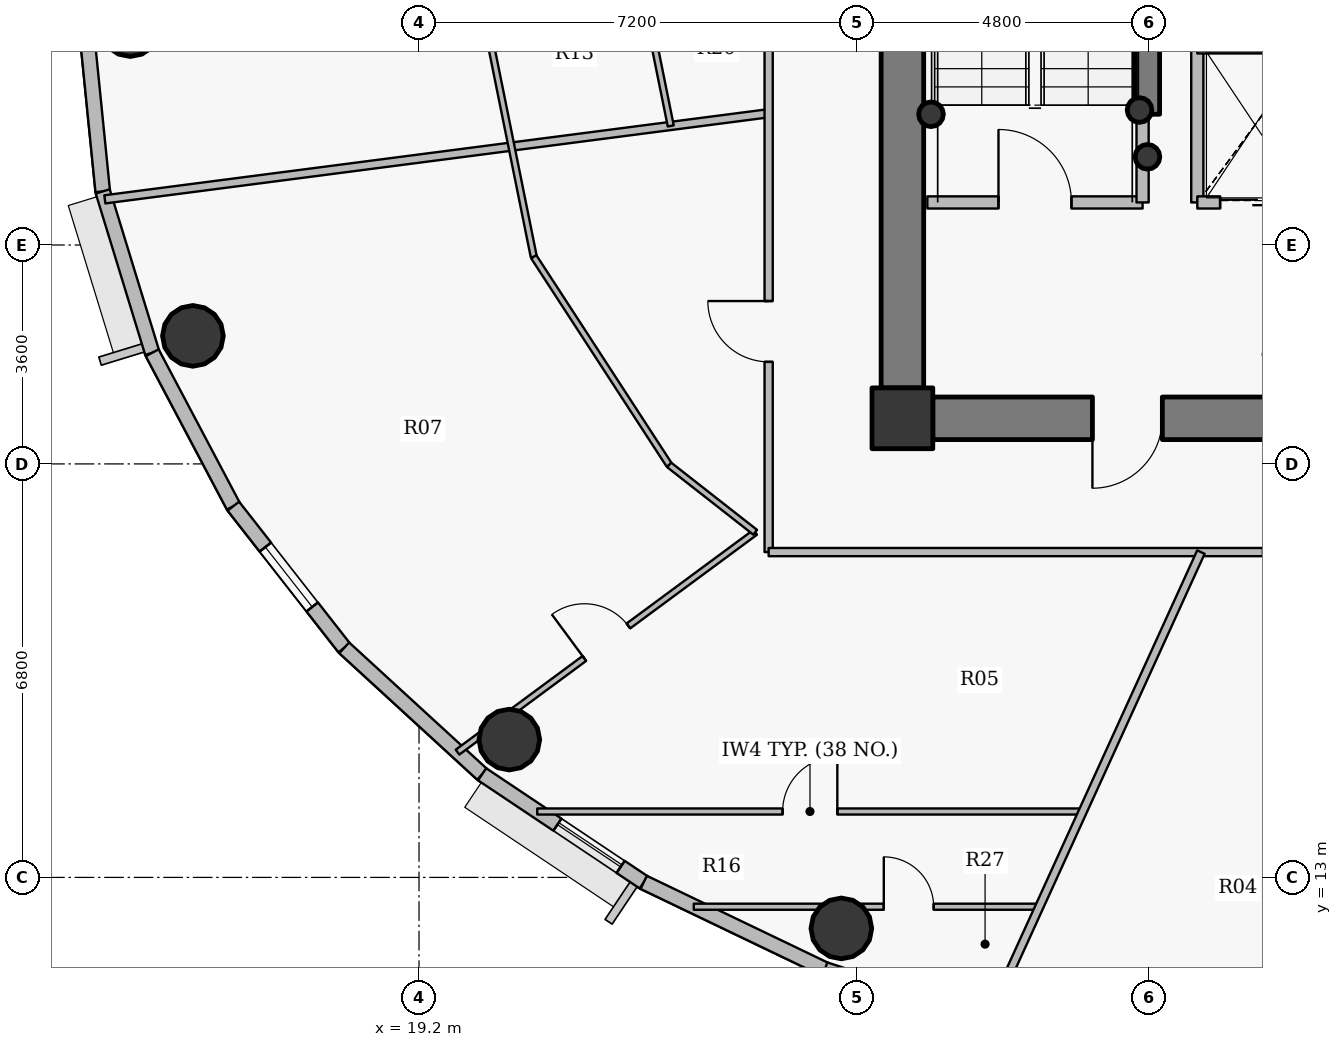
"""IFC4 building model, lengths in metres.
Left out: names, types, materials, properties, quantities, classifications, styles, units other than length and angle.
Written with IfcOpenShell. Run it as: python <this file> out.ifc"""

import sys

from ifc_helpers import new_model, si_unit, direction, frame, frame_2d, origin, origin_2d, place, context, subcontext, project, spatial, rectangle, hollow_circle, extrude, source, transform, mapped, element, fill, save


model = new_model("IFC4")
c1 = context("Model", 3, precision=1e-05, world=origin(), true_north=direction((0.0, 1.0)))
c2 = subcontext(c1, "Body", "Model", "MODEL_VIEW")
j1 = project(units=[si_unit("LENGTHUNIT", "METRE"), si_unit("PLANEANGLEUNIT", "RADIAN")], contexts=[c1])
p1 = place(None, origin())
s1 = spatial("IfcSite", under=j1, at=p1, CompositionType="ELEMENT")
p2 = place(p1, origin())
s2 = spatial("IfcBuilding", under=s1, at=p2, CompositionType="ELEMENT")
p3 = place(p2, frame((0.0, 0.0, 295.5)))
s3 = spatial("IfcBuildingStorey", under=s2, at=p3, CompositionType="ELEMENT", Elevation=295.5)
p4 = place(p3, frame((27.15, 20.55, 0.0), z_axis=(0.0, 0.0, 1.0), x_axis=(1.0, 0.0, 0.0)))
e1 = element("IfcColumn", 1, at=p4, inside=s3, PredefinedType="COLUMN", context=c2, shape_type="SweptSolid", body=[
    extrude(rectangle(XDim=1.0, YDim=1.0, at=origin_2d()), origin(), (0.0, 0.0, 1.0), 3.75),
])
for number, where, z_axis, x_axis in (
    (2, (31.05, 25.62, 0.0), (0.0, 0.0, 1.0), (1.0, 0.0, 0.0)),
    (3, (31.18, 24.85, 0.0), (0.0, 0.0, 1.0), (1.0, 0.0, 0.0)),
    (4, (27.62, 25.55, 0.0), (0.0, 0.0, 1.0), (1.0, 0.0, 0.0)),
):
    element("IfcColumn", number, at=place(p3, frame(where, z_axis=z_axis, x_axis=x_axis)), inside=s3, PredefinedType="COLUMN", context=c2, shape_type="SweptSolid", body=[
        extrude(hollow_circle(Radius=0.203, WallThickness=0.016, at=origin_2d()), origin(), (0.0, 0.0, 1.0), 3.75),
    ])
p5 = place(p3, frame((44.35, 20.55, 0.0), z_axis=(0.0, 0.0, 1.0), x_axis=(-1.0, 0.0, 0.0)))
e5 = element("IfcWall", 5, at=p5, inside=s3, PredefinedType="SHEAR", context=c2, shape_type="SweptSolid", body=[
    extrude(rectangle(XDim=16.7, YDim=0.7, at=frame_2d((8.35, 0.0))), origin(), (0.0, 0.0, 1.0), 3.05),
])
p6 = place(p5, frame((12.925, 0.0, 0.0)))
e6 = element("IfcOpeningElement", 6, at=p6, cuts=e5, PredefinedType="OPENING", context=c2, shape_type="SweptSolid", body=[
    extrude(rectangle(XDim=1.15, YDim=2.15, at=origin_2d()), frame((0.575, 0.36, 1.075), z_axis=(0.0, -1.0, 0.0), x_axis=(1.0, 0.0, 0.0)), (0.0, 0.0, 1.0), 0.72),
])
p7 = place(p5, frame((9.1, 0.0, 0.0)))
e7 = element("IfcOpeningElement", 7, at=p7, cuts=e5, PredefinedType="OPENING", context=c2, shape_type="SweptSolid", body=[
    extrude(rectangle(XDim=1.15, YDim=2.15, at=origin_2d()), frame((0.575, 0.36, 1.075), z_axis=(0.0, -1.0, 0.0), x_axis=(1.0, 0.0, 0.0)), (0.0, 0.0, 1.0), 0.72),
])
p8 = place(p3, frame((27.15, 21.05, 0.0), z_axis=(0.0, 0.0, 1.0), x_axis=(0.0, 1.0, 0.0)))
e8 = element("IfcWall", 8, at=p8, inside=s3, PredefinedType="SHEAR", context=c2, shape_type="SweptSolid", body=[
    extrude(rectangle(XDim=11.9, YDim=0.7, at=frame_2d((5.95, 0.0))), origin(), (0.0, 0.0, 1.0), 3.05),
])
p9 = place(p3, frame((31.18, 25.55, 0.0), z_axis=(0.0, 0.0, 1.0), x_axis=(0.0, 1.0, 0.0)))
e9 = element("IfcWall", 9, at=p9, inside=s3, PredefinedType="SHEAR", context=c2, shape_type="SweptSolid", body=[
    extrude(rectangle(XDim=2.25, YDim=0.4, at=frame_2d((1.125, 0.0))), origin(), (0.0, 0.0, 1.0), 3.1),
])
for number, where, z_axis, x_axis in (
    (10, (14.45, 27.0, 0.0), (0.0, 0.0, 1.0), (1.0, 0.0, 0.0)),
    (11, (15.481, 21.906, 0.0), (0.0, 0.0, 1.0), (1.0, 0.0, 0.0)),
    (12, (20.685, 15.267, 0.0), (0.0, 0.0, 1.0), (1.0, 0.0, 0.0)),
    (13, (26.146, 12.161, 0.0), (0.0, 0.0, 1.0), (1.0, 0.0, 0.0)),
):
    element("IfcColumn", number, at=place(p3, frame(where, z_axis=z_axis, x_axis=x_axis)), inside=s3, PredefinedType="COLUMN", context=c2, shape_type="SweptSolid", body=[
        extrude(hollow_circle(Radius=0.5, WallThickness=0.032, at=origin_2d()), origin(), (0.0, 0.0, 1.0), 3.75),
    ])
p10 = place(p3, frame((13.998, 24.281, 0.0), z_axis=(0.0, 0.0, 1.0), x_axis=(-0.099972526841, 0.99499019788, 0.0)))
e14 = element("IfcWall", 14, at=p10, inside=s3, PredefinedType="SOLIDWALL", context=c2, shape_type="SweptSolid", body=[
    extrude(rectangle(XDim=2.733, YDim=0.24, at=frame_2d((1.366, 0.0))), origin(), (0.0, 0.0, 1.0), 3.5),
])
p11 = place(p3, frame((14.812, 21.628, 0.0), z_axis=(0.0, 0.0, 1.0), x_axis=(-0.2931213403, 0.956075248012, 0.0)))
e15 = element("IfcWall", 15, at=p11, inside=s3, PredefinedType="SOLIDWALL", context=c2, shape_type="SweptSolid", body=[
    extrude(rectangle(XDim=2.775, YDim=0.24, at=frame_2d((1.388, 0.0))), origin(), (0.0, 0.0, 1.0), 3.5),
])
p12 = place(p3, frame((16.146, 19.105, 0.0), z_axis=(0.0, 0.0, 1.0), x_axis=(-0.467628269026, 0.883925224218, 0.0)))
e16 = element("IfcWall", 16, at=p12, inside=s3, PredefinedType="SOLIDWALL", context=c2, shape_type="SweptSolid", body=[
    extrude(rectangle(XDim=2.854, YDim=0.24, at=frame_2d((1.427, 0.0))), origin(), (0.0, 0.0, 1.0), 3.5),
])
p13 = place(p3, frame((17.97, 16.775, 0.0), z_axis=(0.0, 0.0, 1.0), x_axis=(-0.616337186556, 0.787482363275, 0.0)))
e17 = element("IfcWall", 17, at=p13, inside=s3, PredefinedType="SOLIDWALL", context=c2, shape_type="SweptSolid", body=[
    extrude(rectangle(XDim=2.958, YDim=0.24, at=frame_2d((1.479, 0.0))), origin(), (0.0, 0.0, 1.0), 3.5),
])
p14 = place(p13, frame((0.854, 0.0, 0.9)))
e18 = element("IfcOpeningElement", 18, at=p14, cuts=e17, PredefinedType="OPENING", context=c2, shape_type="SweptSolid", body=[
    extrude(rectangle(XDim=1.25, YDim=1.65, at=origin_2d()), frame((0.625, 0.13, 0.825), z_axis=(0.0, -1.0, 0.0), x_axis=(1.0, 0.0, 0.0)), (0.0, 0.0, 1.0), 0.26),
])
p15 = place(p3, frame((20.238, 14.696, 0.0), z_axis=(0.0, 0.0, 1.0), x_axis=(-0.737068506972, 0.675818034703, 0.0)))
e19 = element("IfcWall", 19, at=p15, inside=s3, PredefinedType="SOLIDWALL", context=c2, shape_type="SweptSolid", body=[
    extrude(rectangle(XDim=3.077, YDim=0.24, at=frame_2d((1.539, 0.0))), origin(), (0.0, 0.0, 1.0), 3.5),
])
p16 = place(p3, frame((22.896, 12.918, 0.0), z_axis=(0.0, 0.0, 1.0), x_axis=(-0.831250592635, 0.55589787933, 0.0)))
e20 = element("IfcWall", 20, at=p16, inside=s3, PredefinedType="SOLIDWALL", context=c2, shape_type="SweptSolid", body=[
    extrude(rectangle(XDim=3.197, YDim=0.24, at=frame_2d((1.599, 0.0))), origin(), (0.0, 0.0, 1.0), 3.5),
])
p17 = place(p16, frame((0.458, 0.0, 0.9)))
e21 = element("IfcOpeningElement", 21, at=p17, cuts=e20, PredefinedType="OPENING", context=c2, shape_type="SweptSolid", body=[
    extrude(rectangle(XDim=1.25, YDim=1.65, at=origin_2d()), frame((0.625, 0.13, 0.825), z_axis=(0.0, -1.0, 0.0), x_axis=(1.0, 0.0, 0.0)), (0.0, 0.0, 1.0), 0.26),
])
p18 = place(p3, frame((25.877, 11.488, 0.0), z_axis=(0.0, 0.0, 1.0), x_axis=(-0.901573741254, 0.43262546051, 0.0)))
e22 = element("IfcWall", 22, at=p18, inside=s3, PredefinedType="SOLIDWALL", context=c2, shape_type="SweptSolid", body=[
    extrude(rectangle(XDim=3.307, YDim=0.24, at=frame_2d((1.653, 0.0))), origin(), (0.0, 0.0, 1.0), 3.5),
])
p19 = place(p3, frame((29.109, 10.44, 0.0), z_axis=(0.0, 0.0, 1.0), x_axis=(-0.95123136723, 0.308478339592, 0.0)))
e23 = element("IfcWall", 23, at=p19, inside=s3, PredefinedType="SOLIDWALL", context=c2, shape_type="SweptSolid", body=[
    extrude(rectangle(XDim=3.398, YDim=0.24, at=frame_2d((1.699, 0.0))), origin(), (0.0, 0.0, 1.0), 3.5),
])
p20 = place(p3, frame((14.033, 24.151, 0.0), z_axis=(0.0, 0.0, 1.0), x_axis=(0.99169266035, 0.128629963101, 0.0)))
e24 = element("IfcWall", 24, at=p20, inside=s3, PredefinedType="PARTITIONING", context=c2, shape_type="SweptSolid", body=[
    extrude(rectangle(XDim=11.009, YDim=0.135, at=frame_2d((5.504, 0.0))), origin(), (0.0, 0.0, 1.0), 2.985),
])
p21 = place(p3, frame((19.833, 15.06, 0.0), z_axis=(0.0, 0.0, 1.0), x_axis=(0.804387847123, 0.594104529019, 0.0)))
e25 = element("IfcWall", 25, at=p21, inside=s3, PredefinedType="PARTITIONING", context=c2, shape_type="SweptSolid", body=[
    extrude(rectangle(XDim=6.086, YDim=0.1, at=frame_2d((3.043, 0.0))), origin(), (0.0, 0.0, 1.0), 3.5),
])
p22 = place(p21, frame((2.593, 0.0, 0.0)))
e26 = element("IfcOpeningElement", 26, at=p22, cuts=e25, PredefinedType="OPENING", context=c2, shape_type="SweptSolid", body=[
    extrude(rectangle(XDim=0.9, YDim=2.1, at=origin_2d()), frame((0.45, 0.06, 1.05), z_axis=(0.0, -1.0, 0.0), x_axis=(1.0, 0.0, 0.0)), (0.0, 0.0, 1.0), 0.12),
])
p23 = place(p3, frame((20.32, 27.0, 0.0), z_axis=(0.0, 0.0, 1.0), x_axis=(0.198226068862, -0.980156327135, 0.0)))
e27 = element("IfcWall", 27, at=p23, inside=s3, PredefinedType="PARTITIONING", context=c2, shape_type="SweptSolid", body=[
    extrude(rectangle(XDim=3.871, YDim=0.1, at=frame_2d((1.936, 0.0))), origin(), (0.0, 0.0, 1.0), 3.035),
])
p24 = place(p3, frame((21.087, 23.206, 0.0), z_axis=(0.0, 0.0, 1.0), x_axis=(0.545435886628, -0.838152547916, 0.0)))
e28 = element("IfcWall", 28, at=p24, inside=s3, PredefinedType="PARTITIONING", context=c2, shape_type="SweptSolid", body=[
    extrude(rectangle(XDim=4.083, YDim=0.1, at=frame_2d((2.042, 0.0))), origin(), (0.0, 0.0, 1.0), 3.035),
])
p25 = place(p3, frame((21.144, 14.084, 0.0), z_axis=(0.0, 0.0, 1.0), x_axis=(1.0, 0.0, 0.0)))
e29 = element("IfcWall", 29, at=p25, inside=s3, PredefinedType="PARTITIONING", context=c2, shape_type="SweptSolid", body=[
    extrude(rectangle(XDim=8.971, YDim=0.1, at=frame_2d((4.486, 0.0))), origin(), (0.0, 0.0, 1.0), 2.985),
])
p26 = place(p25, frame((4.036, 0.0, 0.0)))
e30 = element("IfcOpeningElement", 30, at=p26, cuts=e29, PredefinedType="OPENING", context=c2, shape_type="SweptSolid", body=[
    extrude(rectangle(XDim=0.9, YDim=2.1, at=origin_2d()), frame((0.45, 0.06, 1.05), z_axis=(0.0, -1.0, 0.0), x_axis=(1.0, 0.0, 0.0)), (0.0, 0.0, 1.0), 0.12),
])
p27 = place(p3, frame((23.008, 27.0, 0.0), z_axis=(0.0, 0.0, 1.0), x_axis=(0.198189512146, -0.980163719628, 0.0)))
e31 = element("IfcWall", 31, at=p27, inside=s3, PredefinedType="PARTITIONING", context=c2, shape_type="SweptSolid", body=[
    extrude(rectangle(XDim=1.675, YDim=0.1, at=frame_2d((0.838, 0.0))), origin(), (0.0, 0.0, 1.0), 3.035),
])
p28 = place(p3, frame((23.315, 19.783, 0.0), z_axis=(0.0, 0.0, 1.0), x_axis=(0.787284128546, -0.616590383431, 0.0)))
e32 = element("IfcWall", 32, at=p28, inside=s3, PredefinedType="PARTITIONING", context=c2, shape_type="SweptSolid", body=[
    extrude(rectangle(XDim=1.796, YDim=0.1, at=frame_2d((0.898, 0.0))), origin(), (0.0, 0.0, 1.0), 3.5),
])
p29 = place(p3, frame((23.719, 12.518, 0.0), z_axis=(0.0, 0.0, 1.0), x_axis=(1.0, 0.0, 0.0)))
e33 = element("IfcWall", 33, at=p29, inside=s3, PredefinedType="PARTITIONING", context=c2, shape_type="SweptSolid", body=[
    extrude(rectangle(XDim=5.683, YDim=0.1, at=frame_2d((2.842, 0.0))), origin(), (0.0, 0.0, 1.0), 2.985),
])
p30 = place(p29, frame((3.125, 0.0, 0.0)))
e34 = element("IfcOpeningElement", 34, at=p30, cuts=e33, PredefinedType="OPENING", context=c2, shape_type="SweptSolid", body=[
    extrude(rectangle(XDim=0.82, YDim=2.1, at=origin_2d()), frame((0.41, 0.06, 1.05), z_axis=(0.0, -1.0, 0.0), x_axis=(1.0, 0.0, 0.0)), (0.0, 0.0, 1.0), 0.12),
])
p31 = place(p3, frame((24.95, 18.35, 0.0), z_axis=(0.0, 0.0, 1.0), x_axis=(0.0, 1.0, 0.0)))
e35 = element("IfcWall", 35, at=p31, inside=s3, PredefinedType="PARTITIONING", context=c2, shape_type="SweptSolid", body=[
    extrude(rectangle(XDim=11.45, YDim=0.135, at=frame_2d((5.725, 0.0))), origin(), (0.0, 0.0, 1.0), 3.035),
])
p32 = place(p31, frame((3.128, 0.0, 0.0)))
e36 = element("IfcOpeningElement", 36, at=p32, cuts=e35, PredefinedType="OPENING", context=c2, shape_type="SweptSolid", body=[
    extrude(rectangle(XDim=1.0, YDim=2.15, at=origin_2d()), frame((0.5, 0.078, 1.075), z_axis=(0.0, -1.0, 0.0), x_axis=(1.0, 0.0, 0.0)), (0.0, 0.0, 1.0), 0.155),
])
p33 = place(p3, frame((24.95, 18.35, 0.0), z_axis=(0.0, 0.0, 1.0), x_axis=(1.0, 0.0, 0.0)))
e37 = element("IfcWall", 37, at=p33, inside=s3, PredefinedType="PARTITIONING", context=c2, shape_type="SweptSolid", body=[
    extrude(rectangle(XDim=22.1, YDim=0.135, at=frame_2d((11.05, 0.0))), origin(), (0.0, 0.0, 1.0), 3.035),
])
p34 = place(p33, frame((8.131, 0.0, 0.0)))
e38 = element("IfcOpeningElement", 38, at=p34, cuts=e37, PredefinedType="OPENING", context=c2, shape_type="SweptSolid", body=[
    extrude(rectangle(XDim=1.0, YDim=2.15, at=origin_2d()), frame((0.5, 0.078, 1.075), z_axis=(0.0, -1.0, 0.0), x_axis=(1.0, 0.0, 0.0)), (0.0, 0.0, 1.0), 0.155),
])
p35 = place(p33, frame((19.081, 0.0, 0.0)))
e39 = element("IfcOpeningElement", 39, at=p35, cuts=e37, PredefinedType="OPENING", context=c2, shape_type="SweptSolid", body=[
    extrude(rectangle(XDim=1.0, YDim=2.15, at=origin_2d()), frame((0.5, 0.078, 1.075), z_axis=(0.0, -1.0, 0.0), x_axis=(1.0, 0.0, 0.0)), (0.0, 0.0, 1.0), 0.155),
])
p36 = place(p3, frame((27.56, 24.1, 0.0), z_axis=(0.0, 0.0, 1.0), x_axis=(1.0, 0.0, 0.0)))
e40 = element("IfcWall", 40, at=p36, inside=s3, PredefinedType="PARTITIONING", context=c2, shape_type="SweptSolid", body=[
    extrude(rectangle(XDim=3.54, YDim=0.2, at=frame_2d((1.77, 0.0))), origin(), (0.0, 0.0, 1.0), 3.5),
])
p37 = place(p36, frame((1.17, 0.0, 0.0)))
e41 = element("IfcOpeningElement", 41, at=p37, cuts=e40, PredefinedType="OPENING", context=c2, shape_type="SweptSolid", body=[
    extrude(rectangle(XDim=1.2, YDim=2.15, at=origin_2d()), frame((0.6, 0.11, 1.075), z_axis=(0.0, -1.0, 0.0), x_axis=(1.0, 0.0, 0.0)), (0.0, 0.0, 1.0), 0.22),
])
p38 = place(p3, frame((28.537, 10.62, 0.0), z_axis=(0.0, 0.0, 1.0), x_axis=(0.414582330606, 0.910011808247, 0.0)))
e42 = element("IfcWall", 42, at=p38, inside=s3, PredefinedType="PARTITIONING", context=c2, shape_type="SweptSolid", body=[
    extrude(rectangle(XDim=8.495, YDim=0.135, at=frame_2d((4.247, 0.0))), origin(), (0.0, 0.0, 1.0), 2.985),
])
p39 = place(p3, frame((31.1, 24.1, 0.0), z_axis=(0.0, 0.0, 1.0), x_axis=(0.0, 1.0, 0.0)))
e43 = element("IfcWall", 43, at=p39, inside=s3, PredefinedType="PARTITIONING", context=c2, shape_type="SweptSolid", body=[
    extrude(rectangle(XDim=1.44, YDim=0.2, at=frame_2d((0.72, 0.0))), origin(), (0.0, 0.0, 1.0), 3.5),
])
p40 = place(p3, frame((32.0, 24.1, 0.0), z_axis=(0.0, 0.0, 1.0), x_axis=(0.0, 1.0, 0.0)))
e44 = element("IfcWall", 44, at=p40, inside=s3, PredefinedType="PARTITIONING", context=c2, shape_type="SweptSolid", body=[
    extrude(rectangle(XDim=3.45, YDim=0.2, at=frame_2d((1.725, 0.0))), origin(), (0.0, 0.0, 1.0), 3.5),
])
p41 = place(p3, frame((32.0, 24.1, 0.0), z_axis=(0.0, 0.0, 1.0), x_axis=(1.0, 0.0, 0.0)))
e45 = element("IfcWall", 45, at=p41, inside=s3, PredefinedType="PARTITIONING", context=c2, shape_type="SweptSolid", body=[
    extrude(rectangle(XDim=1.9, YDim=0.2, at=frame_2d((0.95, 0.0))), origin(), (0.0, 0.0, 1.0), 3.085),
])
p42 = place(p41, frame((0.375, 0.0, 0.0)))
e46 = element("IfcOpeningElement", 46, at=p42, cuts=e45, PredefinedType="OPENING", context=c2, shape_type="SweptSolid", body=[
    extrude(rectangle(XDim=1.15, YDim=2.15, at=origin_2d()), frame((0.575, 0.11, 1.075), z_axis=(0.0, -1.0, 0.0), x_axis=(1.0, 0.0, 0.0)), (0.0, 0.0, 1.0), 0.22),
])
p43 = place(p3, frame((32.0, 26.65, 0.0), z_axis=(0.0, 0.0, 1.0), x_axis=(1.0, 0.0, 0.0)))
e47 = element("IfcWall", 47, at=p43, inside=s3, PredefinedType="PARTITIONING", context=c2, shape_type="SweptSolid", body=[
    extrude(rectangle(XDim=1.9, YDim=0.2, at=frame_2d((0.95, 0.0))), origin(), (0.0, 0.0, 1.0), 3.085),
])
p44 = place(p3, frame((26.8, 21.04, 0.0), z_axis=(0.0, 0.0, 1.0), x_axis=(0.0, -1.0, 0.0)))
e48 = element("IfcWall", 48, at=p44, inside=s3, PredefinedType="PARTITIONING", context=c2, shape_type="SweptSolid", body=[
    extrude(rectangle(XDim=0.84, YDim=0.135, at=frame_2d((0.42, 0.0))), origin(), (0.0, 0.0, 1.0), 3.035),
])
p45 = place(p3, frame((27.107, 20.2, 0.0), z_axis=(0.0, 0.0, 1.0), x_axis=(1.0, 0.0, 0.0)))
e49 = element("IfcWall", 49, at=p45, inside=s3, PredefinedType="PARTITIONING", context=c2, shape_type="SweptSolid", body=[
    extrude(rectangle(XDim=0.532, YDim=0.135, at=frame_2d((0.266, 0.0))), origin(), (0.0, 0.0, 1.0), 3.035),
])
m1 = source(origin(), c2, "Body", "SweptSolid", [
    extrude(rectangle(XDim=1.25, YDim=1.65, at=origin_2d()), frame((0.625, 0.03, 0.825), z_axis=(0.0, -1.0, 0.0), x_axis=(1.0, 0.0, 0.0)), (0.0, 0.0, 1.0), 0.06),
])
p46 = place(p14, origin())
e50 = element("IfcWindow", 50, at=p46, inside=s3, PartitioningType="SINGLE_PANEL", PredefinedType="WINDOW", context=c2, shape_type="MappedRepresentation", body=[
    mapped(m1, transform((0.0, 0.0, 0.0), x_axis=(1.0, 0.0, 0.0), y_axis=(0.0, 1.0, 0.0), z_axis=(0.0, 0.0, 1.0), scale=1.0)),
])
fill(e18, e50)
p47 = place(p17, origin())
e51 = element("IfcWindow", 51, at=p47, inside=s3, PartitioningType="SINGLE_PANEL", PredefinedType="WINDOW", context=c2, shape_type="MappedRepresentation", body=[
    mapped(m1, transform((0.0, 0.0, 0.0), x_axis=(1.0, 0.0, 0.0), y_axis=(0.0, 1.0, 0.0), z_axis=(0.0, 0.0, 1.0), scale=1.0)),
])
fill(e21, e51)
m2 = source(origin(), c2, "Body", "SweptSolid", [
    extrude(rectangle(XDim=1.15, YDim=2.15, at=origin_2d()), frame((0.575, 0.025, 1.075), z_axis=(0.0, -1.0, 0.0), x_axis=(1.0, 0.0, 0.0)), (0.0, 0.0, 1.0), 0.05),
])
p48 = place(p6, origin())
e52 = element("IfcDoor", 52, at=p48, inside=s3, OperationType="SINGLE_SWING_RIGHT", PredefinedType="DOOR", context=c2, shape_type="MappedRepresentation", body=[
    mapped(m2, transform((0.0, 0.0, 0.0), x_axis=(1.0, 0.0, 0.0), y_axis=(0.0, 1.0, 0.0), z_axis=(0.0, 0.0, 1.0), scale=1.0)),
])
fill(e6, e52)
m3 = source(origin(), c2, "Body", "SweptSolid", [
    extrude(rectangle(XDim=1.2, YDim=2.15, at=origin_2d()), frame((0.6, 0.025, 1.075), z_axis=(0.0, -1.0, 0.0), x_axis=(1.0, 0.0, 0.0)), (0.0, 0.0, 1.0), 0.05),
])
p49 = place(p37, origin())
e53 = element("IfcDoor", 53, at=p49, inside=s3, OperationType="SINGLE_SWING_LEFT", PredefinedType="DOOR", context=c2, shape_type="MappedRepresentation", body=[
    mapped(m3, transform((0.0, 0.0, 0.0), x_axis=(1.0, 0.0, 0.0), y_axis=(0.0, 1.0, 0.0), z_axis=(0.0, 0.0, 1.0), scale=1.0)),
])
fill(e41, e53)
m4 = source(origin(), c2, "Body", "SweptSolid", [
    extrude(rectangle(XDim=1.15, YDim=2.15, at=origin_2d()), frame((0.575, 0.025, 1.075), z_axis=(0.0, -1.0, 0.0), x_axis=(1.0, 0.0, 0.0)), (0.0, 0.0, 1.0), 0.05),
])
p50 = place(p42, origin())
e54 = element("IfcDoor", 54, at=p50, inside=s3, OperationType="DOUBLE_DOOR_SLIDING", PredefinedType="USERDEFINED", context=c2, shape_type="MappedRepresentation", body=[
    mapped(m4, transform((0.0, 0.0, 0.0), x_axis=(1.0, 0.0, 0.0), y_axis=(0.0, 1.0, 0.0), z_axis=(0.0, 0.0, 1.0), scale=1.0)),
])
fill(e46, e54)
m5 = source(origin(), c2, "Body", "SweptSolid", [
    extrude(rectangle(XDim=1.0, YDim=2.15, at=origin_2d()), frame((0.5, 0.025, 1.075), z_axis=(0.0, -1.0, 0.0), x_axis=(1.0, 0.0, 0.0)), (0.0, 0.0, 1.0), 0.05),
])
p51 = place(p32, origin())
e55 = element("IfcDoor", 55, at=p51, inside=s3, OperationType="SINGLE_SWING_RIGHT", PredefinedType="DOOR", context=c2, shape_type="MappedRepresentation", body=[
    mapped(m5, transform((0.0, 0.0, 0.0), x_axis=(1.0, 0.0, 0.0), y_axis=(0.0, 1.0, 0.0), z_axis=(0.0, 0.0, 1.0), scale=1.0)),
])
fill(e36, e55)
m6 = source(origin(), c2, "Body", "SweptSolid", [
    extrude(rectangle(XDim=0.9, YDim=2.1, at=origin_2d()), frame((0.45, 0.025, 1.05), z_axis=(0.0, -1.0, 0.0), x_axis=(1.0, 0.0, 0.0)), (0.0, 0.0, 1.0), 0.05),
])
p52 = place(p22, origin())
e56 = element("IfcDoor", 56, at=p52, inside=s3, OperationType="SINGLE_SWING_LEFT", PredefinedType="DOOR", context=c2, shape_type="MappedRepresentation", body=[
    mapped(m6, transform((0.0, 0.0, 0.0), x_axis=(1.0, 0.0, 0.0), y_axis=(0.0, 1.0, 0.0), z_axis=(0.0, 0.0, 1.0), scale=1.0)),
])
fill(e26, e56)
p53 = place(p26, origin())
e57 = element("IfcDoor", 57, at=p53, inside=s3, OperationType="SINGLE_SWING_RIGHT", PredefinedType="DOOR", context=c2, shape_type="MappedRepresentation", body=[
    mapped(m6, transform((0.0, 0.0, 0.0), x_axis=(1.0, 0.0, 0.0), y_axis=(0.0, 1.0, 0.0), z_axis=(0.0, 0.0, 1.0), scale=1.0)),
])
fill(e30, e57)
m7 = source(origin(), c2, "Body", "SweptSolid", [
    extrude(rectangle(XDim=0.82, YDim=2.1, at=origin_2d()), frame((0.41, 0.025, 1.05), z_axis=(0.0, -1.0, 0.0), x_axis=(1.0, 0.0, 0.0)), (0.0, 0.0, 1.0), 0.05),
])
p54 = place(p30, origin())
e58 = element("IfcDoor", 58, at=p54, inside=s3, OperationType="SINGLE_SWING_LEFT", PredefinedType="DOOR", context=c2, shape_type="MappedRepresentation", body=[
    mapped(m7, transform((0.0, 0.0, 0.0), x_axis=(1.0, 0.0, 0.0), y_axis=(0.0, 1.0, 0.0), z_axis=(0.0, 0.0, 1.0), scale=1.0)),
])
fill(e34, e58)
save(model, sys.argv[1])
